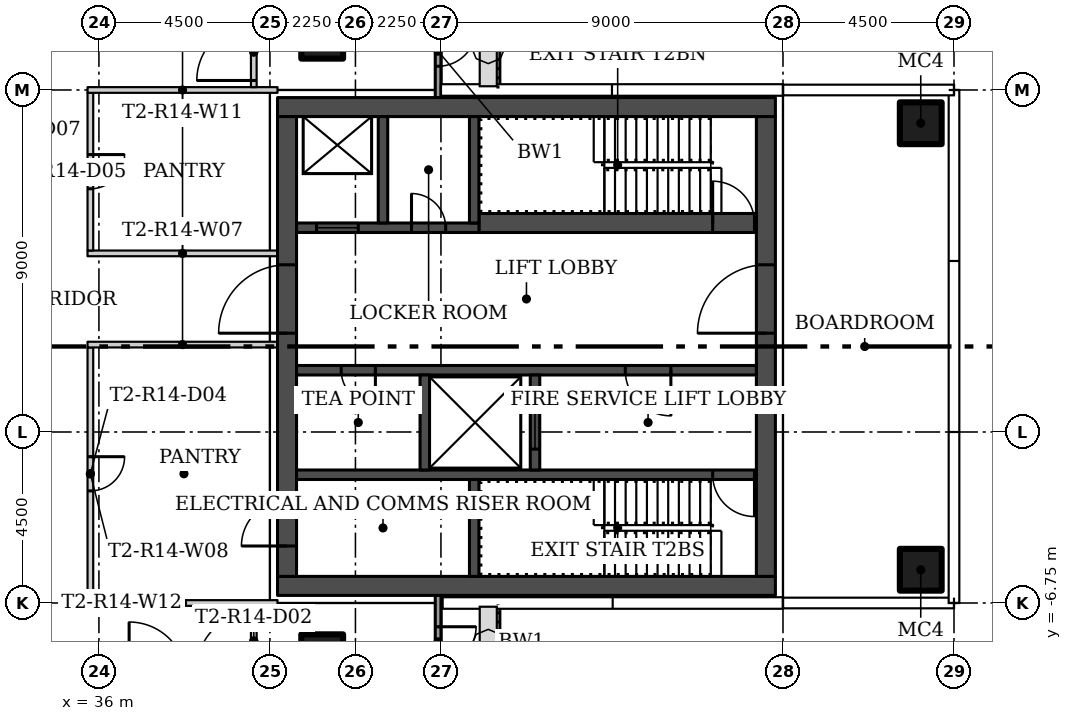
"""IFC4 building model, lengths in metres.
Left out: names, types, materials, properties, quantities, classifications, styles, units other than length and angle.
Written with IfcOpenShell. Run it as: python <this file> out.ifc"""

import sys

from ifc_helpers import new_model, si_unit, direction, frame, frame_2d, origin, origin_2d, place, context, subcontext, project, spatial, rectangle, hollow_rectangle, extrude, element, fill, save


model = new_model("IFC4")
c1 = context("Model", 3, precision=1e-05, world=origin(), true_north=direction((0.0, 1.0)))
c2 = subcontext(c1, "Body", "Model", "MODEL_VIEW")
j1 = project(units=[si_unit("LENGTHUNIT", "METRE"), si_unit("PLANEANGLEUNIT", "RADIAN")], contexts=[c1])
p1 = place(None, origin())
s1 = spatial("IfcSite", under=j1, at=p1, CompositionType="ELEMENT")
p2 = place(p1, origin())
s2 = spatial("IfcBuilding", under=s1, at=p2, CompositionType="ELEMENT")
p3 = place(p2, frame((0.0, 0.0, 138.9)))
s3 = spatial("IfcBuildingStorey", under=s2, at=p3, CompositionType="ELEMENT", Elevation=138.9)
for number, where in (
    (1, (41.875, 8.125, 0.0)),
    (2, (41.875, -8.125, 0.0)),
    (3, (57.625, -5.875, 0.0)),
    (4, (57.625, 5.875, 0.0)),
):
    element("IfcColumn", number, at=place(p3, frame(where)), inside=s3, PredefinedType="COLUMN", context=c2, shape_type="SweptSolid", body=[
        extrude(hollow_rectangle(XDim=1.1, YDim=1.1, WallThickness=0.04, at=origin_2d()), origin(), (0.0, 0.0, 1.0), 3.55),
    ])
p4 = place(p3, frame((35.7, 2.45, 0.0)))
e5 = element("IfcWall", 5, at=p4, inside=s3, PredefinedType="PARTITIONING", context=c2, shape_type="SweptSolid", body=[
    extrude(rectangle(XDim=5.0, YDim=0.15, at=frame_2d((2.5, 0.0))), origin(), (0.0, 0.0, 1.0), 3.55),
])
p5 = place(p3, frame((35.775, -0.025, 0.0), z_axis=(0.0, 0.0, 1.0), x_axis=(0.0, -1.0, 0.0)))
e6 = element("IfcWall", 6, at=p5, inside=s3, PredefinedType="PARTITIONING", context=c2, shape_type="SweptSolid", body=[
    extrude(rectangle(XDim=6.65, YDim=0.15, at=frame_2d((3.325, 0.0))), origin(), (0.0, 0.0, 1.0), 3.55),
])
p6 = place(p5, frame((2.875, 0.0, 0.0)))
e7 = element("IfcOpeningElement", 7, at=p6, cuts=e6, PredefinedType="OPENING", context=c2, shape_type="SweptSolid", body=[
    extrude(rectangle(XDim=0.9, YDim=2.1, at=frame_2d((0.45, 1.05))), frame((0.0, 0.085, 0.0), z_axis=(0.0, -1.0, 0.0), x_axis=(1.0, 0.0, 0.0)), (0.0, 0.0, 1.0), 0.17),
])
p7 = place(p3, frame((35.775, 6.675, 0.0), z_axis=(0.0, 0.0, 1.0), x_axis=(0.0, -1.0, 0.0)))
e8 = element("IfcWall", 8, at=p7, inside=s3, PredefinedType="PARTITIONING", context=c2, shape_type="SweptSolid", body=[
    extrude(rectangle(XDim=4.15, YDim=0.15, at=frame_2d((2.075, 0.0))), origin(), (0.0, 0.0, 1.0), 3.55),
])
p8 = place(p7, frame((1.625, 0.0, 0.0)))
e9 = element("IfcOpeningElement", 9, at=p8, cuts=e8, PredefinedType="OPENING", context=c2, shape_type="SweptSolid", body=[
    extrude(rectangle(XDim=0.9, YDim=2.1, at=frame_2d((0.45, 1.05))), frame((0.0, 0.085, 0.0), z_axis=(0.0, -1.0, 0.0), x_axis=(1.0, 0.0, 0.0)), (0.0, 0.0, 1.0), 0.17),
])
p9 = place(p3, frame((40.7, 6.75, 0.0), z_axis=(0.0, 0.0, 1.0), x_axis=(-1.0, 0.0, 0.0)))
e10 = element("IfcWall", 10, at=p9, inside=s3, PredefinedType="PARTITIONING", context=c2, shape_type="SweptSolid", body=[
    extrude(rectangle(XDim=5.0, YDim=0.15, at=frame_2d((2.5, 0.0))), origin(), (0.0, 0.0, 1.0), 3.55),
])
p10 = place(p3, frame((35.7, -6.75, 0.0)))
e11 = element("IfcWall", 11, at=p10, inside=s3, PredefinedType="PARTITIONING", context=c2, shape_type="SweptSolid", body=[
    extrude(rectangle(XDim=5.0, YDim=0.15, at=frame_2d((2.5, 0.0))), origin(), (0.0, 0.0, 1.0), 3.55),
])
p11 = place(p3, frame((40.7, 0.05, 0.0), z_axis=(0.0, 0.0, 1.0), x_axis=(-1.0, 0.0, 0.0)))
e12 = element("IfcWall", 12, at=p11, inside=s3, PredefinedType="PARTITIONING", context=c2, shape_type="SweptSolid", body=[
    extrude(rectangle(XDim=5.0, YDim=0.15, at=frame_2d((2.5, 0.0))), origin(), (0.0, 0.0, 1.0), 3.55),
])
p12 = place(p3, frame((40.075, 6.825, 0.0), z_axis=(0.0, 0.0, 1.0), x_axis=(0.0, 1.0, 0.0)))
e13 = element("IfcWall", 13, at=p12, inside=s3, PredefinedType="PARTITIONING", context=c2, shape_type="SweptSolid", body=[
    extrude(rectangle(XDim=1.85, YDim=0.15, at=frame_2d((0.925, 0.0))), origin(), (0.0, 0.0, 1.0), 3.55),
])
p13 = place(p12, frame((0.175, 0.0, 0.0)))
e14 = element("IfcOpeningElement", 14, at=p13, cuts=e13, PredefinedType="OPENING", context=c2, shape_type="SweptSolid", body=[
    extrude(rectangle(XDim=1.5, YDim=2.1, at=frame_2d((0.75, 1.05))), frame((0.0, 0.085, 0.0), z_axis=(0.0, -1.0, 0.0), x_axis=(1.0, 0.0, 0.0)), (0.0, 0.0, 1.0), 0.17),
])
p14 = place(p3, frame((40.075, -8.675, 0.0), z_axis=(0.0, 0.0, 1.0), x_axis=(0.0, 1.0, 0.0)))
e15 = element("IfcWall", 15, at=p14, inside=s3, PredefinedType="PARTITIONING", context=c2, shape_type="SweptSolid", body=[
    extrude(rectangle(XDim=1.85, YDim=0.15, at=frame_2d((0.925, 0.0))), origin(), (0.0, 0.0, 1.0), 3.55),
])
p15 = place(p14, frame((0.175, 0.0, 0.0)))
e16 = element("IfcOpeningElement", 16, at=p15, cuts=e15, PredefinedType="OPENING", context=c2, shape_type="SweptSolid", body=[
    extrude(rectangle(XDim=1.5, YDim=2.1, at=frame_2d((0.75, 1.05))), frame((0.0, 0.085, 0.0), z_axis=(0.0, -1.0, 0.0), x_axis=(1.0, 0.0, 0.0)), (0.0, 0.0, 1.0), 0.17),
])
p16 = place(p3, frame((44.925, 9.0, 0.0), z_axis=(0.0, 0.0, 1.0), x_axis=(0.0, -1.0, 0.0)))
e17 = element("IfcWall", 17, at=p16, inside=s3, PredefinedType="SOLIDWALL", context=c2, shape_type="SweptSolid", body=[
    extrude(rectangle(XDim=2.457, YDim=0.15, at=frame_2d((1.229, 0.0))), origin(), (0.0, 0.0, 1.0), 3.45),
])
p17 = place(p16, frame((0.625, 0.0, 0.0)))
e18 = element("IfcOpeningElement", 18, at=p17, cuts=e17, PredefinedType="OPENING", context=c2, shape_type="SweptSolid", body=[
    extrude(rectangle(XDim=1.0, YDim=2.4, at=frame_2d((0.5, 1.2))), frame((0.0, 0.085, 0.0), z_axis=(0.0, -1.0, 0.0), x_axis=(1.0, 0.0, 0.0)), (0.0, 0.0, 1.0), 0.17),
])
p18 = place(p3, frame((44.925, -6.543, 0.0), z_axis=(0.0, 0.0, 1.0), x_axis=(0.0, -1.0, 0.0)))
e19 = element("IfcWall", 19, at=p18, inside=s3, PredefinedType="SOLIDWALL", context=c2, shape_type="SweptSolid", body=[
    extrude(rectangle(XDim=2.457, YDim=0.15, at=frame_2d((1.229, 0.0))), origin(), (0.0, 0.0, 1.0), 3.45),
])
p19 = place(p18, frame((0.832, 0.0, 0.0)))
e20 = element("IfcOpeningElement", 20, at=p19, cuts=e19, PredefinedType="OPENING", context=c2, shape_type="SweptSolid", body=[
    extrude(rectangle(XDim=1.0, YDim=2.4, at=frame_2d((0.5, 1.2))), frame((0.0, 0.085, 0.0), z_axis=(0.0, -1.0, 0.0), x_axis=(1.0, 0.0, 0.0)), (0.0, 0.0, 1.0), 0.17),
])
for number, where, z_axis, x_axis in (
    (21, (53.8, -6.3, 0.0), (0.0, 0.0, 1.0), (-1.0, 0.0, 0.0)),
    (22, (53.8, 6.3, 0.0), (0.0, 0.0, 1.0), (-1.0, 0.0, 0.0)),
):
    element("IfcWall", number, at=place(p3, frame(where, z_axis=z_axis, x_axis=x_axis)), inside=s3, PredefinedType="SHEAR", context=c2, shape_type="SweptSolid", body=[
        extrude(rectangle(XDim=13.1, YDim=0.5, at=frame_2d((6.55, 0.0))), origin(), (0.0, 0.0, 1.0), 3.55),
    ])
p20 = place(p3, frame((53.55, -6.05, 0.0), z_axis=(0.0, 0.0, 1.0), x_axis=(0.0, 1.0, 0.0)))
e23 = element("IfcWall", 23, at=p20, inside=s3, PredefinedType="SHEAR", context=c2, shape_type="SweptSolid", body=[
    extrude(rectangle(XDim=12.1, YDim=0.5, at=frame_2d((6.05, 0.0))), origin(), (0.0, 0.0, 1.0), 3.55),
])
p21 = place(p20, frame((6.4, 0.0, 0.0)))
e24 = element("IfcOpeningElement", 24, at=p21, cuts=e23, PredefinedType="OPENING", context=c2, shape_type="SweptSolid", body=[
    extrude(rectangle(XDim=1.8, YDim=2.4, at=frame_2d((0.9, 1.2))), frame((0.0, 0.26, 0.0), z_axis=(0.0, -1.0, 0.0), x_axis=(1.0, 0.0, 0.0)), (0.0, 0.0, 1.0), 0.52),
])
p22 = place(p3, frame((40.95, -6.05, 0.0), z_axis=(0.0, 0.0, 1.0), x_axis=(0.0, 1.0, 0.0)))
e25 = element("IfcWall", 25, at=p22, inside=s3, PredefinedType="SHEAR", context=c2, shape_type="SweptSolid", body=[
    extrude(rectangle(XDim=12.1, YDim=0.5, at=frame_2d((6.05, 0.0))), origin(), (0.0, 0.0, 1.0), 3.55),
])
p23 = place(p22, frame((0.8, 0.0, 0.0)))
e26 = element("IfcOpeningElement", 26, at=p23, cuts=e25, PredefinedType="OPENING", context=c2, shape_type="SweptSolid", body=[
    extrude(rectangle(XDim=1.2, YDim=2.1, at=frame_2d((0.6, 1.05))), frame((0.0, 0.26, 0.0), z_axis=(0.0, -1.0, 0.0), x_axis=(1.0, 0.0, 0.0)), (0.0, 0.0, 1.0), 0.52),
])
p24 = place(p22, frame((6.4, 0.0, 0.0)))
e27 = element("IfcOpeningElement", 27, at=p24, cuts=e25, PredefinedType="OPENING", context=c2, shape_type="SweptSolid", body=[
    extrude(rectangle(XDim=1.8, YDim=2.4, at=frame_2d((0.9, 1.2))), frame((0.0, 0.26, 0.0), z_axis=(0.0, -1.0, 0.0), x_axis=(1.0, 0.0, 0.0)), (0.0, 0.0, 1.0), 0.52),
])
p25 = place(p3, frame((53.3, -3.375, 0.0), z_axis=(0.0, 0.0, 1.0), x_axis=(-1.0, 0.0, 0.0)))
e28 = element("IfcWall", 28, at=p25, inside=s3, PredefinedType="SHEAR", context=c2, shape_type="SweptSolid", body=[
    extrude(rectangle(XDim=12.1, YDim=0.25, at=frame_2d((6.05, 0.0))), origin(), (0.0, 0.0, 1.0), 3.55),
])
p26 = place(p25, frame((0.05, 0.0, 0.0)))
e29 = element("IfcOpeningElement", 29, at=p26, cuts=e28, PredefinedType="OPENING", context=c2, shape_type="SweptSolid", body=[
    extrude(rectangle(XDim=1.1, YDim=2.1, at=frame_2d((0.55, 1.05))), frame((0.0, 0.135, 0.0), z_axis=(0.0, -1.0, 0.0), x_axis=(1.0, 0.0, 0.0)), (0.0, 0.0, 1.0), 0.27),
])
p27 = place(p3, frame((45.875, -6.05, 0.0), z_axis=(0.0, 0.0, 1.0), x_axis=(0.0, 1.0, 0.0)))
e30 = element("IfcWall", 30, at=p27, inside=s3, PredefinedType="SHEAR", context=c2, shape_type="SweptSolid", body=[
    extrude(rectangle(XDim=2.55, YDim=0.25, at=frame_2d((1.275, 0.0))), origin(), (0.0, 0.0, 1.0), 3.55),
])
p28 = place(p3, frame((53.3, -0.625, 0.0), z_axis=(0.0, 0.0, 1.0), x_axis=(-1.0, 0.0, 0.0)))
e31 = element("IfcWall", 31, at=p28, inside=s3, PredefinedType="SHEAR", context=c2, shape_type="SweptSolid", body=[
    extrude(rectangle(XDim=12.1, YDim=0.25, at=frame_2d((6.05, 0.0))), origin(), (0.0, 0.0, 1.0), 3.55),
])
p29 = place(p28, frame((2.25, 0.0, 0.0)))
e32 = element("IfcOpeningElement", 32, at=p29, cuts=e31, PredefinedType="OPENING", context=c2, shape_type="SweptSolid", body=[
    extrude(rectangle(XDim=1.2, YDim=2.1, at=frame_2d((0.6, 1.05))), frame((0.0, 0.135, 0.0), z_axis=(0.0, -1.0, 0.0), x_axis=(1.0, 0.0, 0.0)), (0.0, 0.0, 1.0), 0.27),
])
p30 = place(p28, frame((10.025, 0.0, 0.0)))
e33 = element("IfcOpeningElement", 33, at=p30, cuts=e31, PredefinedType="OPENING", context=c2, shape_type="SweptSolid", body=[
    extrude(rectangle(XDim=0.9, YDim=2.1, at=frame_2d((0.45, 1.05))), frame((0.0, 0.135, 0.0), z_axis=(0.0, -1.0, 0.0), x_axis=(1.0, 0.0, 0.0)), (0.0, 0.0, 1.0), 0.27),
])
p31 = place(p3, frame((47.475, -3.25, 0.0), z_axis=(0.0, 0.0, 1.0), x_axis=(0.0, 1.0, 0.0)))
e34 = element("IfcWall", 34, at=p31, inside=s3, PredefinedType="SHEAR", context=c2, shape_type="SweptSolid", body=[
    extrude(rectangle(XDim=2.5, YDim=0.25, at=frame_2d((1.25, 0.0))), origin(), (0.0, 0.0, 1.0), 3.55),
])
p32 = place(p31, frame((0.55, 0.0, 0.0)))
e35 = element("IfcOpeningElement", 35, at=p32, cuts=e34, PredefinedType="OPENING", context=c2, shape_type="SweptSolid", body=[
    extrude(rectangle(XDim=1.4, YDim=2.4, at=frame_2d((0.7, 1.2))), frame((0.0, 0.135, 0.0), z_axis=(0.0, -1.0, 0.0), x_axis=(1.0, 0.0, 0.0)), (0.0, 0.0, 1.0), 0.27),
])
p33 = place(p3, frame((44.575, -3.25, 0.0), z_axis=(0.0, 0.0, 1.0), x_axis=(0.0, 1.0, 0.0)))
e36 = element("IfcWall", 36, at=p33, inside=s3, PredefinedType="SHEAR", context=c2, shape_type="SweptSolid", body=[
    extrude(rectangle(XDim=2.5, YDim=0.25, at=frame_2d((1.25, 0.0))), origin(), (0.0, 0.0, 1.0), 3.55),
])
p34 = place(p3, frame((46.0, 3.25, 0.0)))
e37 = element("IfcWall", 37, at=p34, inside=s3, PredefinedType="SHEAR", context=c2, shape_type="SweptSolid", body=[
    extrude(rectangle(XDim=7.3, YDim=0.5, at=frame_2d((3.65, 0.0))), origin(), (0.0, 0.0, 1.0), 3.55),
])
p35 = place(p34, frame((6.15, 0.0, 0.0)))
e38 = element("IfcOpeningElement", 38, at=p35, cuts=e37, PredefinedType="OPENING", context=c2, shape_type="SweptSolid", body=[
    extrude(rectangle(XDim=1.1, YDim=2.1, at=frame_2d((0.55, 1.05))), frame((0.0, 0.26, 0.0), z_axis=(0.0, -1.0, 0.0), x_axis=(1.0, 0.0, 0.0)), (0.0, 0.0, 1.0), 0.52),
])
p36 = place(p3, frame((41.2, 3.125, 0.0)))
e39 = element("IfcWall", 39, at=p36, inside=s3, PredefinedType="SHEAR", context=c2, shape_type="SweptSolid", body=[
    extrude(rectangle(XDim=4.8, YDim=0.25, at=frame_2d((2.4, 0.0))), origin(), (0.0, 0.0, 1.0), 3.55),
])
p37 = place(p36, frame((0.525, 0.0, 0.0)))
e40 = element("IfcOpeningElement", 40, at=p37, cuts=e39, PredefinedType="OPENING", context=c2, shape_type="SweptSolid", body=[
    extrude(rectangle(XDim=1.1, YDim=2.1, at=frame_2d((0.55, 1.05))), frame((0.0, 0.135, 0.0), z_axis=(0.0, -1.0, 0.0), x_axis=(1.0, 0.0, 0.0)), (0.0, 0.0, 1.0), 0.27),
])
p38 = place(p36, frame((3.025, 0.0, 0.0)))
e41 = element("IfcOpeningElement", 41, at=p38, cuts=e39, PredefinedType="OPENING", context=c2, shape_type="SweptSolid", body=[
    extrude(rectangle(XDim=0.9, YDim=2.1, at=frame_2d((0.45, 1.05))), frame((0.0, 0.135, 0.0), z_axis=(0.0, -1.0, 0.0), x_axis=(1.0, 0.0, 0.0)), (0.0, 0.0, 1.0), 0.27),
])
for number, where, z_axis, x_axis in (
    (42, (45.875, 3.25, 0.0), (0.0, 0.0, 1.0), (0.0, 1.0, 0.0)),
    (43, (43.475, 3.25, 0.0), (0.0, 0.0, 1.0), (0.0, 1.0, 0.0)),
):
    element("IfcWall", number, at=place(p3, frame(where, z_axis=z_axis, x_axis=x_axis)), inside=s3, PredefinedType="SHEAR", context=c2, shape_type="SweptSolid", body=[
        extrude(rectangle(XDim=2.8, YDim=0.25, at=frame_2d((1.4, 0.0))), origin(), (0.0, 0.0, 1.0), 3.55),
    ])
p39 = place(p15, origin())
e44 = element("IfcDoor", 44, at=p39, inside=s3, OperationType="DOUBLE_DOOR_SINGLE_SWING", PredefinedType="DOOR", context=c2, shape_type="SweptSolid", body=[
    extrude(rectangle(XDim=1.5, YDim=2.1, at=frame_2d((0.75, 1.05))), frame((0.0, 0.025, 0.0), z_axis=(0.0, -1.0, 0.0), x_axis=(1.0, 0.0, 0.0)), (0.0, 0.0, 1.0), 0.05),
])
fill(e16, e44)
p40 = place(p13, origin())
e45 = element("IfcDoor", 45, at=p40, inside=s3, OperationType="DOUBLE_DOOR_SINGLE_SWING", PredefinedType="DOOR", context=c2, shape_type="SweptSolid", body=[
    extrude(rectangle(XDim=1.5, YDim=2.1, at=frame_2d((0.75, 1.05))), frame((0.0, 0.025, 0.0), z_axis=(0.0, -1.0, 0.0), x_axis=(1.0, 0.0, 0.0)), (0.0, 0.0, 1.0), 0.05),
])
fill(e14, e45)
p41 = place(p6, origin())
e46 = element("IfcDoor", 46, at=p41, inside=s3, OperationType="SINGLE_SWING_LEFT", PredefinedType="DOOR", context=c2, shape_type="SweptSolid", body=[
    extrude(rectangle(XDim=0.9, YDim=2.1, at=frame_2d((0.45, 1.05))), frame((0.0, 0.025, 0.0), z_axis=(0.0, -1.0, 0.0), x_axis=(1.0, 0.0, 0.0)), (0.0, 0.0, 1.0), 0.05),
])
fill(e7, e46)
p42 = place(p8, origin())
e47 = element("IfcDoor", 47, at=p42, inside=s3, OperationType="SINGLE_SWING_RIGHT", PredefinedType="DOOR", context=c2, shape_type="SweptSolid", body=[
    extrude(rectangle(XDim=0.9, YDim=2.1, at=frame_2d((0.45, 1.05))), frame((0.0, 0.025, 0.0), z_axis=(0.0, -1.0, 0.0), x_axis=(1.0, 0.0, 0.0)), (0.0, 0.0, 1.0), 0.05),
])
fill(e9, e47)
p43 = place(p17, origin())
e48 = element("IfcDoor", 48, at=p43, inside=s3, OperationType="SINGLE_SWING_LEFT", PredefinedType="DOOR", context=c2, shape_type="SweptSolid", body=[
    extrude(rectangle(XDim=1.0, YDim=2.4, at=frame_2d((0.5, 1.2))), frame((0.0, 0.025, 0.0), z_axis=(0.0, -1.0, 0.0), x_axis=(1.0, 0.0, 0.0)), (0.0, 0.0, 1.0), 0.05),
])
fill(e18, e48)
p44 = place(p19, origin())
e49 = element("IfcDoor", 49, at=p44, inside=s3, OperationType="SINGLE_SWING_RIGHT", PredefinedType="DOOR", context=c2, shape_type="SweptSolid", body=[
    extrude(rectangle(XDim=1.0, YDim=2.4, at=frame_2d((0.5, 1.2))), frame((0.0, 0.025, 0.0), z_axis=(0.0, -1.0, 0.0), x_axis=(1.0, 0.0, 0.0)), (0.0, 0.0, 1.0), 0.05),
])
fill(e20, e49)
p45 = place(p21, origin())
e50 = element("IfcDoor", 50, at=p45, inside=s3, OperationType="DOUBLE_DOOR_SINGLE_SWING", PredefinedType="DOOR", context=c2, shape_type="SweptSolid", body=[
    extrude(rectangle(XDim=1.8, YDim=2.4, at=frame_2d((0.9, 1.2))), frame((0.0, 0.025, 0.0), z_axis=(0.0, -1.0, 0.0), x_axis=(1.0, 0.0, 0.0)), (0.0, 0.0, 1.0), 0.05),
])
fill(e24, e50)
p46 = place(p23, origin())
e51 = element("IfcDoor", 51, at=p46, inside=s3, OperationType="SINGLE_SWING_LEFT", PredefinedType="DOOR", context=c2, shape_type="SweptSolid", body=[
    extrude(rectangle(XDim=1.2, YDim=2.1, at=frame_2d((0.6, 1.05))), frame((0.0, 0.025, 0.0), z_axis=(0.0, -1.0, 0.0), x_axis=(1.0, 0.0, 0.0)), (0.0, 0.0, 1.0), 0.05),
])
fill(e26, e51)
p47 = place(p24, origin())
e52 = element("IfcDoor", 52, at=p47, inside=s3, OperationType="DOUBLE_DOOR_SINGLE_SWING", PredefinedType="DOOR", context=c2, shape_type="SweptSolid", body=[
    extrude(rectangle(XDim=1.8, YDim=2.4, at=frame_2d((0.9, 1.2))), frame((0.0, 0.025, 0.0), z_axis=(0.0, -1.0, 0.0), x_axis=(1.0, 0.0, 0.0)), (0.0, 0.0, 1.0), 0.05),
])
fill(e27, e52)
p48 = place(p26, origin())
e53 = element("IfcDoor", 53, at=p48, inside=s3, OperationType="SINGLE_SWING_LEFT", PredefinedType="DOOR", context=c2, shape_type="SweptSolid", body=[
    extrude(rectangle(XDim=1.1, YDim=2.1, at=frame_2d((0.55, 1.05))), frame((0.0, 0.025, 0.0), z_axis=(0.0, -1.0, 0.0), x_axis=(1.0, 0.0, 0.0)), (0.0, 0.0, 1.0), 0.05),
])
fill(e29, e53)
p49 = place(p29, origin())
e54 = element("IfcDoor", 54, at=p49, inside=s3, OperationType="SINGLE_SWING_LEFT", PredefinedType="DOOR", context=c2, shape_type="SweptSolid", body=[
    extrude(rectangle(XDim=1.2, YDim=2.1, at=frame_2d((0.6, 1.05))), frame((0.0, 0.025, 0.0), z_axis=(0.0, -1.0, 0.0), x_axis=(1.0, 0.0, 0.0)), (0.0, 0.0, 1.0), 0.05),
])
fill(e32, e54)
p50 = place(p30, origin())
e55 = element("IfcDoor", 55, at=p50, inside=s3, OperationType="SINGLE_SWING_RIGHT", PredefinedType="DOOR", context=c2, shape_type="SweptSolid", body=[
    extrude(rectangle(XDim=0.9, YDim=2.1, at=frame_2d((0.45, 1.05))), frame((0.0, 0.025, 0.0), z_axis=(0.0, -1.0, 0.0), x_axis=(1.0, 0.0, 0.0)), (0.0, 0.0, 1.0), 0.05),
])
fill(e33, e55)
p51 = place(p32, origin())
e56 = element("IfcDoor", 56, at=p51, inside=s3, OperationType="SLIDING_TO_LEFT", PredefinedType="DOOR", context=c2, shape_type="SweptSolid", body=[
    extrude(rectangle(XDim=1.4, YDim=2.4, at=frame_2d((0.7, 1.2))), frame((0.0, 0.025, 0.0), z_axis=(0.0, -1.0, 0.0), x_axis=(1.0, 0.0, 0.0)), (0.0, 0.0, 1.0), 0.05),
])
fill(e35, e56)
p52 = place(p35, origin())
e57 = element("IfcDoor", 57, at=p52, inside=s3, OperationType="SINGLE_SWING_RIGHT", PredefinedType="DOOR", context=c2, shape_type="SweptSolid", body=[
    extrude(rectangle(XDim=1.1, YDim=2.1, at=frame_2d((0.55, 1.05))), frame((0.0, 0.025, 0.0), z_axis=(0.0, -1.0, 0.0), x_axis=(1.0, 0.0, 0.0)), (0.0, 0.0, 1.0), 0.05),
])
fill(e38, e57)
p53 = place(p37, origin())
e58 = element("IfcDoor", 58, at=p53, inside=s3, OperationType="SLIDING_TO_LEFT", PredefinedType="DOOR", context=c2, shape_type="SweptSolid", body=[
    extrude(rectangle(XDim=1.1, YDim=2.1, at=frame_2d((0.55, 1.05))), frame((0.0, 0.025, 0.0), z_axis=(0.0, -1.0, 0.0), x_axis=(1.0, 0.0, 0.0)), (0.0, 0.0, 1.0), 0.05),
])
fill(e40, e58)
p54 = place(p38, origin())
e59 = element("IfcDoor", 59, at=p54, inside=s3, OperationType="SINGLE_SWING_RIGHT", PredefinedType="DOOR", context=c2, shape_type="SweptSolid", body=[
    extrude(rectangle(XDim=0.9, YDim=2.1, at=frame_2d((0.45, 1.05))), frame((0.0, 0.025, 0.0), z_axis=(0.0, -1.0, 0.0), x_axis=(1.0, 0.0, 0.0)), (0.0, 0.0, 1.0), 0.05),
])
fill(e41, e59)
save(model, sys.argv[1])
